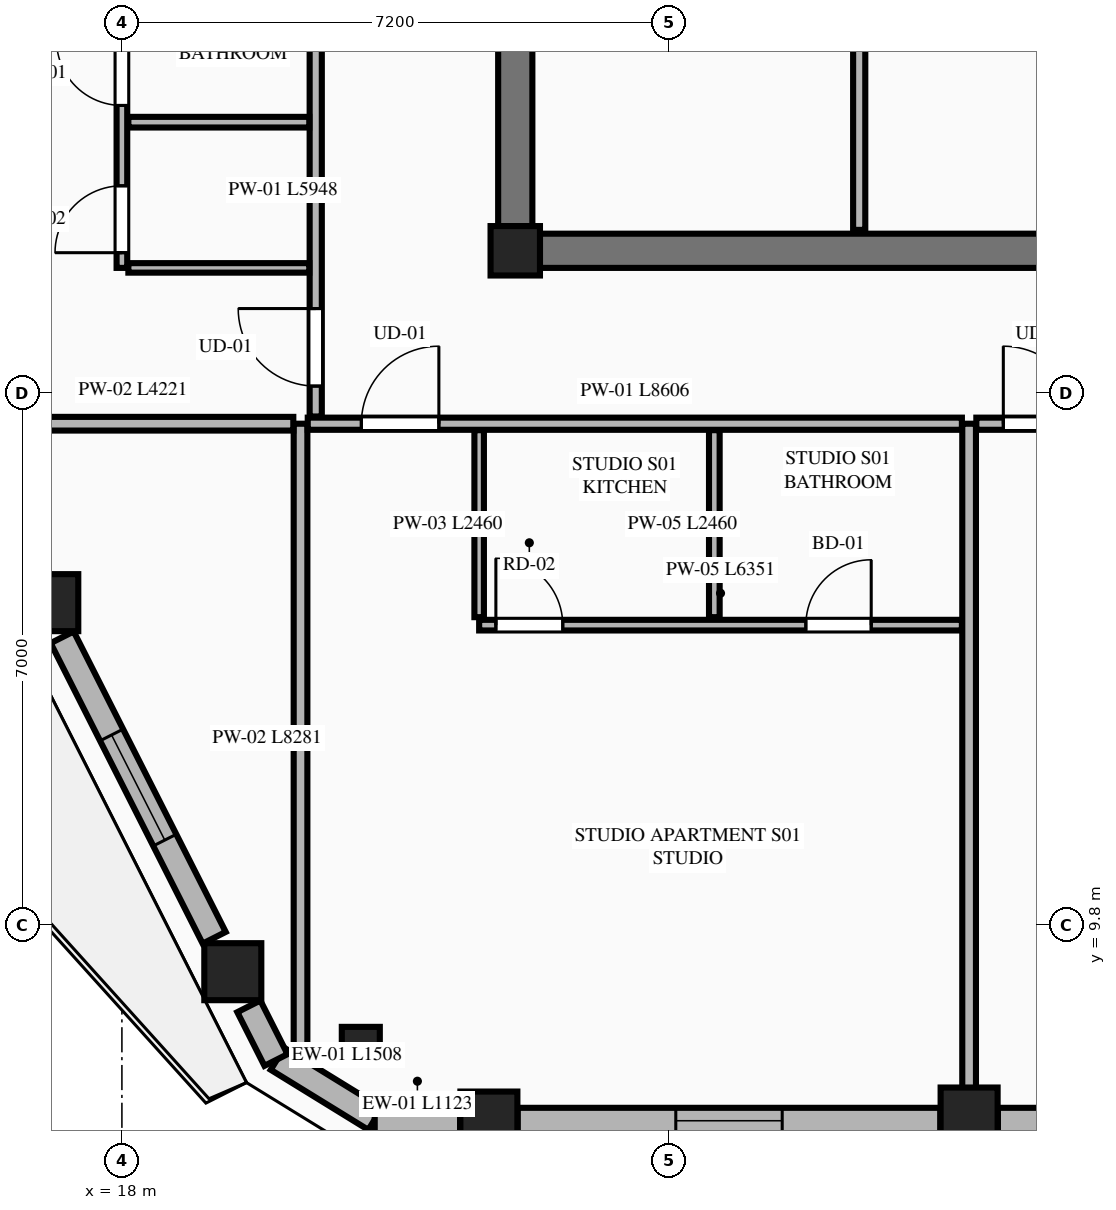
"""IFC4 building model, lengths in metres.
Left out: names, types, materials, properties, quantities, classifications, styles, units other than length and angle.
Written with IfcOpenShell. Run it as: python <this file> out.ifc"""

import sys

from ifc_helpers import new_model, si_unit, direction, frame, frame_2d, origin, origin_2d, place, context, subcontext, project, spatial, rectangle, extrude, element, fill, save


model = new_model("IFC4")
c1 = context("Model", 3, precision=1e-05, world=origin(), true_north=direction((0.0, 1.0)))
c2 = subcontext(c1, "Body", "Model", "MODEL_VIEW")
j1 = project(units=[si_unit("LENGTHUNIT", "METRE"), si_unit("PLANEANGLEUNIT", "RADIAN")], contexts=[c1])
p1 = place(None, origin())
s1 = spatial("IfcSite", under=j1, at=p1, CompositionType="ELEMENT")
p2 = place(p1, origin())
s2 = spatial("IfcBuilding", under=s1, at=p2, CompositionType="ELEMENT")
p3 = place(p2, frame((0.0, 0.0, 245.25)))
s3 = spatial("IfcBuildingStorey", under=s2, at=p3, CompositionType="ELEMENT", Elevation=245.25)
p4 = place(p3, frame((23.175, 18.675, 0.0), z_axis=(0.0, 0.0, 1.0), x_axis=(1.0, 0.0, 0.0)))
e1 = element("IfcColumn", 1, at=p4, inside=s3, PredefinedType="COLUMN", context=c2, shape_type="SweptSolid", body=[
    extrude(rectangle(XDim=0.65, YDim=0.65, at=origin_2d()), origin(), (0.0, 0.0, 1.0), 3.65),
])
p5 = place(p3, frame((23.5, 18.675, 0.0), z_axis=(0.0, 0.0, 1.0), x_axis=(1.0, 0.0, 0.0)))
e2 = element("IfcWall", 2, at=p5, inside=s3, PredefinedType="SHEAR", context=c2, shape_type="SweptSolid", body=[
    extrude(rectangle(XDim=17.8, YDim=0.45, at=frame_2d((8.9, 0.0))), origin(), (0.0, 0.0, 1.0), 3.45),
])
p6 = place(p3, frame((23.175, 19.0, 0.0), z_axis=(0.0, 0.0, 1.0), x_axis=(0.0, 1.0, 0.0)))
e3 = element("IfcWall", 3, at=p6, inside=s3, PredefinedType="SHEAR", context=c2, shape_type="SweptSolid", body=[
    extrude(rectangle(XDim=13.8, YDim=0.45, at=frame_2d((6.9, 0.0))), origin(), (0.0, 0.0, 1.0), 3.45),
])
p7 = place(p6, frame((2.84, 0.0, 0.0)))
e4 = element("IfcOpeningElement", 4, at=p7, cuts=e3, PredefinedType="OPENING", context=c2, shape_type="SweptSolid", body=[
    extrude(rectangle(XDim=1.22, YDim=2.25, at=frame_2d((0.61, 1.125))), frame((0.0, 0.235, 0.0), z_axis=(0.0, -1.0, 0.0), x_axis=(1.0, 0.0, 0.0)), (0.0, 0.0, 1.0), 0.47),
])
for number, where, z_axis, x_axis in (
    (5, (22.828, 7.239, 0.0), (0.0, 0.0, 1.0), (1.0, 0.0, 0.0)),
    (6, (29.146, 7.292, 0.0), (0.0, 0.0, 1.0), (1.0, 0.0, 0.0)),
    (7, (17.051, 14.046, 0.0), (0.0, 0.0, 1.0), (1.0, 0.0, 0.0)),
    (8, (19.459, 9.191, 0.0), (0.0, 0.0, 1.0), (1.0, 0.0, 0.0)),
):
    element("IfcColumn", number, at=place(p3, frame(where, z_axis=z_axis, x_axis=x_axis)), inside=s3, PredefinedType="COLUMN", context=c2, shape_type="SweptSolid", body=[
        extrude(rectangle(XDim=0.75, YDim=0.75, at=origin_2d()), origin(), (0.0, 0.0, 1.0), 3.65),
    ])
p8 = place(p3, frame((21.143, 8.215, 0.0), z_axis=(0.0, 0.0, 1.0), x_axis=(0.865256437757, -0.501329529272, 0.0)))
e9 = element("IfcColumn", 9, at=p8, inside=s3, PredefinedType="PILASTER", context=c2, shape_type="SweptSolid", body=[
    extrude(rectangle(XDim=0.5, YDim=0.35, at=origin_2d()), origin(), (0.0, 0.0, 1.0), 3.65),
])
p9 = place(p3, frame((27.7, 18.95, 0.0), z_axis=(0.0, 0.0, 1.0), x_axis=(0.0, 1.0, 0.0)))
e10 = element("IfcWall", 10, at=p9, inside=s3, PredefinedType="PARTITIONING", context=c2, shape_type="SweptSolid", body=[
    extrude(rectangle(XDim=2.73, YDim=0.16, at=frame_2d((1.365, 0.0))), origin(), (0.0, 0.0, 1.0), 3.45),
])
p10 = place(p3, frame((20.047, 8.045, 0.0), z_axis=(0.0, 0.0, 1.0), x_axis=(0.851680557619, -0.52406128246, 0.0)))
e11 = element("IfcWall", 11, at=p10, inside=s3, PredefinedType="STANDARD", context=c2, shape_type="SweptSolid", body=[
    extrude(rectangle(XDim=1.508, YDim=0.34, at=frame_2d((0.754, 0.0))), origin(), (0.0, 0.0, 1.0), 3.45),
])
p11 = place(p3, frame((21.326, 7.23, 0.0), z_axis=(0.0, 0.0, 1.0), x_axis=(1.0, 0.0, 0.0)))
e12 = element("IfcWall", 12, at=p11, inside=s3, PredefinedType="STANDARD", context=c2, shape_type="SweptSolid", body=[
    extrude(rectangle(XDim=1.123, YDim=0.34, at=frame_2d((0.562, 0.0))), origin(), (0.0, 0.0, 1.0), 3.45),
])
p12 = place(p3, frame((23.207, 7.23, 0.0), z_axis=(0.0, 0.0, 1.0), x_axis=(1.0, 0.0, 0.0)))
e13 = element("IfcWall", 13, at=p12, inside=s3, PredefinedType="STANDARD", context=c2, shape_type="SweptSolid", body=[
    extrude(rectangle(XDim=5.56, YDim=0.34, at=frame_2d((2.78, 0.0))), origin(), (0.0, 0.0, 1.0), 2.983),
])
p13 = place(p12, frame((2.08, 0.0, 0.75)))
e14 = element("IfcOpeningElement", 14, at=p13, cuts=e13, PredefinedType="OPENING", context=c2, shape_type="SweptSolid", body=[
    extrude(rectangle(XDim=1.4, YDim=2.05, at=frame_2d((0.7, 1.025))), frame((0.0, 0.18, 0.0), z_axis=(0.0, -1.0, 0.0), x_axis=(1.0, 0.0, 0.0)), (0.0, 0.0, 1.0), 0.36),
])
p14 = place(p3, frame((29.525, 7.23, 0.0), z_axis=(0.0, 0.0, 1.0), x_axis=(1.0, 0.0, 0.0)))
e15 = element("IfcWall", 15, at=p14, inside=s3, PredefinedType="STANDARD", context=c2, shape_type="SweptSolid", body=[
    extrude(rectangle(XDim=5.75, YDim=0.34, at=frame_2d((2.875, 0.0))), origin(), (0.0, 0.0, 1.0), 2.983),
])
p15 = place(p14, frame((2.325, 0.0, 0.0)))
e16 = element("IfcOpeningElement", 16, at=p15, cuts=e15, PredefinedType="OPENING", context=c2, shape_type="SweptSolid", body=[
    extrude(rectangle(XDim=1.1, YDim=2.25, at=frame_2d((0.55, 1.125))), frame((0.0, 0.18, 0.0), z_axis=(0.0, -1.0, 0.0), x_axis=(1.0, 0.0, 0.0)), (0.0, 0.0, 1.0), 0.36),
])
p16 = place(p3, frame((17.214, 13.59, 0.0), z_axis=(0.0, 0.0, 1.0), x_axis=(0.451440846853, -0.892301048858, 0.0)))
e17 = element("IfcWall", 17, at=p16, inside=s3, PredefinedType="STANDARD", context=c2, shape_type="SweptSolid", body=[
    extrude(rectangle(XDim=4.43, YDim=0.34, at=frame_2d((2.215, 0.0))), origin(), (0.0, 0.0, 1.0), 2.983),
])
p17 = place(p16, frame((1.44, 0.0, 0.75)))
e18 = element("IfcOpeningElement", 18, at=p17, cuts=e17, PredefinedType="OPENING", context=c2, shape_type="SweptSolid", body=[
    extrude(rectangle(XDim=1.55, YDim=2.05, at=frame_2d((0.775, 1.025))), frame((0.0, 0.18, 0.0), z_axis=(0.0, -1.0, 0.0), x_axis=(1.0, 0.0, 0.0)), (0.0, 0.0, 1.0), 0.36),
])
p18 = place(p3, frame((19.67, 8.735, 0.0), z_axis=(0.0, 0.0, 1.0), x_axis=(0.451404919072, -0.89231922485, 0.0)))
e19 = element("IfcWall", 19, at=p18, inside=s3, PredefinedType="STANDARD", context=c2, shape_type="SweptSolid", body=[
    extrude(rectangle(XDim=0.791, YDim=0.34, at=frame_2d((0.396, 0.0))), origin(), (0.0, 0.0, 1.0), 3.45),
])
p19 = place(p3, frame((20.35, 8.119, 0.0), z_axis=(0.0, 0.0, 1.0), x_axis=(0.0, 1.0, 0.0)))
e20 = element("IfcWall", 20, at=p19, inside=s3, PredefinedType="PARTITIONING", context=c2, shape_type="SweptSolid", body=[
    extrude(rectangle(XDim=8.281, YDim=0.18, at=frame_2d((4.141, 0.0))), origin(), (0.0, 0.0, 1.0), 3.45),
])
p20 = place(p3, frame((29.146, 7.405, 0.0), z_axis=(0.0, 0.0, 1.0), x_axis=(0.0, 1.0, 0.0)))
e21 = element("IfcWall", 21, at=p20, inside=s3, PredefinedType="PARTITIONING", context=c2, shape_type="SweptSolid", body=[
    extrude(rectangle(XDim=8.995, YDim=0.18, at=frame_2d((4.498, 0.0))), origin(), (0.0, 0.0, 1.0), 2.907),
])
p21 = place(p3, frame((20.445, 16.4, 0.0), z_axis=(0.0, 0.0, 1.0), x_axis=(1.0, 0.0, 0.0)))
e22 = element("IfcWall", 22, at=p21, inside=s3, PredefinedType="PARTITIONING", context=c2, shape_type="SweptSolid", body=[
    extrude(rectangle(XDim=8.606, YDim=0.16, at=frame_2d((4.303, 0.0))), origin(), (0.0, 0.0, 1.0), 3.45),
])
p22 = place(p21, frame((0.705, 0.0, 0.0)))
e23 = element("IfcOpeningElement", 23, at=p22, cuts=e22, PredefinedType="OPENING", context=c2, shape_type="SweptSolid", body=[
    extrude(rectangle(XDim=1.02, YDim=2.25, at=frame_2d((0.51, 1.125))), frame((0.0, 0.09, 0.0), z_axis=(0.0, -1.0, 0.0), x_axis=(1.0, 0.0, 0.0)), (0.0, 0.0, 1.0), 0.18),
])
p23 = place(p3, frame((22.7, 13.855, 0.0), z_axis=(0.0, 0.0, 1.0), x_axis=(0.0, 1.0, 0.0)))
e24 = element("IfcWall", 24, at=p23, inside=s3, PredefinedType="PARTITIONING", context=c2, shape_type="SweptSolid", body=[
    extrude(rectangle(XDim=2.46, YDim=0.125, at=frame_2d((1.23, 0.0))), origin(), (0.0, 0.0, 1.0), 2.907),
])
p24 = place(p3, frame((22.7, 13.75, 0.0), z_axis=(0.0, 0.0, 1.0), x_axis=(1.0, 0.0, 0.0)))
e25 = element("IfcWall", 25, at=p24, inside=s3, PredefinedType="PLUMBINGWALL", context=c2, shape_type="SweptSolid", body=[
    extrude(rectangle(XDim=6.351, YDim=0.14, at=frame_2d((3.176, 0.0))), origin(), (0.0, 0.0, 1.0), 3.45),
])
p25 = place(p24, frame((4.298, 0.0, 0.0)))
e26 = element("IfcOpeningElement", 26, at=p25, cuts=e25, PredefinedType="OPENING", context=c2, shape_type="SweptSolid", body=[
    extrude(rectangle(XDim=0.86, YDim=2.1, at=frame_2d((0.43, 1.05))), frame((0.0, 0.08, 0.0), z_axis=(0.0, -1.0, 0.0), x_axis=(1.0, 0.0, 0.0)), (0.0, 0.0, 1.0), 0.16),
])
p26 = place(p24, frame((0.22, 0.0, 0.0)))
e27 = element("IfcOpeningElement", 27, at=p26, cuts=e25, PredefinedType="OPENING", context=c2, shape_type="SweptSolid", body=[
    extrude(rectangle(XDim=0.88, YDim=2.15, at=frame_2d((0.44, 1.075))), frame((0.0, 0.08, 0.0), z_axis=(0.0, -1.0, 0.0), x_axis=(1.0, 0.0, 0.0)), (0.0, 0.0, 1.0), 0.16),
])
p27 = place(p3, frame((25.794, 13.855, 0.0), z_axis=(0.0, 0.0, 1.0), x_axis=(0.0, 1.0, 0.0)))
e28 = element("IfcWall", 28, at=p27, inside=s3, PredefinedType="PLUMBINGWALL", context=c2, shape_type="SweptSolid", body=[
    extrude(rectangle(XDim=2.46, YDim=0.14, at=frame_2d((1.23, 0.0))), origin(), (0.0, 0.0, 1.0), 3.45),
])
p28 = place(p3, frame((29.241, 16.4, 0.0), z_axis=(0.0, 0.0, 1.0), x_axis=(1.0, 0.0, 0.0)))
e29 = element("IfcWall", 29, at=p28, inside=s3, PredefinedType="PARTITIONING", context=c2, shape_type="SweptSolid", body=[
    extrude(rectangle(XDim=6.318, YDim=0.16, at=frame_2d((3.159, 0.0))), origin(), (0.0, 0.0, 1.0), 3.45),
])
p29 = place(p28, frame((0.355, 0.0, 0.0)))
e30 = element("IfcOpeningElement", 30, at=p29, cuts=e29, PredefinedType="OPENING", context=c2, shape_type="SweptSolid", body=[
    extrude(rectangle(XDim=1.02, YDim=2.25, at=frame_2d((0.51, 1.125))), frame((0.0, 0.09, 0.0), z_axis=(0.0, -1.0, 0.0), x_axis=(1.0, 0.0, 0.0)), (0.0, 0.0, 1.0), 0.18),
])
p30 = place(p3, frame((16.034, 16.4, 0.0), z_axis=(0.0, 0.0, 1.0), x_axis=(1.0, 0.0, 0.0)))
e31 = element("IfcWall", 31, at=p30, inside=s3, PredefinedType="PARTITIONING", context=c2, shape_type="SweptSolid", body=[
    extrude(rectangle(XDim=4.221, YDim=0.18, at=frame_2d((2.11, 0.0))), origin(), (0.0, 0.0, 1.0), 3.45),
])
p31 = place(p3, frame((20.55, 16.495, 0.0), z_axis=(0.0, 0.0, 1.0), x_axis=(0.0, 1.0, 0.0)))
e32 = element("IfcWall", 32, at=p31, inside=s3, PredefinedType="PARTITIONING", context=c2, shape_type="SweptSolid", body=[
    extrude(rectangle(XDim=5.948, YDim=0.16, at=frame_2d((2.974, 0.0))), origin(), (0.0, 0.0, 1.0), 3.137),
])
p32 = place(p31, frame((0.4, 0.0, 0.0)))
e33 = element("IfcOpeningElement", 33, at=p32, cuts=e32, PredefinedType="OPENING", context=c2, shape_type="SweptSolid", body=[
    extrude(rectangle(XDim=1.02, YDim=2.25, at=frame_2d((0.51, 1.125))), frame((0.0, 0.09, 0.0), z_axis=(0.0, -1.0, 0.0), x_axis=(1.0, 0.0, 0.0)), (0.0, 0.0, 1.0), 0.18),
])
p33 = place(p3, frame((18.085, 18.45, 0.0), z_axis=(0.0, 0.0, 1.0), x_axis=(1.0, 0.0, 0.0)))
e34 = element("IfcWall", 34, at=p33, inside=s3, PredefinedType="PARTITIONING", context=c2, shape_type="SweptSolid", body=[
    extrude(rectangle(XDim=2.38, YDim=0.125, at=frame_2d((1.19, 0.0))), origin(), (0.0, 0.0, 1.0), 3.45),
])
p34 = place(p3, frame((18.0, 18.45, 0.0), z_axis=(0.0, 0.0, 1.0), x_axis=(0.0, 1.0, 0.0)))
e35 = element("IfcWall", 35, at=p34, inside=s3, PredefinedType="PLUMBINGWALL", context=c2, shape_type="SweptSolid", body=[
    extrude(rectangle(XDim=3.993, YDim=0.14, at=frame_2d((1.997, 0.0))), origin(), (0.0, 0.0, 1.0), 3.45),
])
p35 = place(p34, frame((2.137, 0.0, 0.0)))
e36 = element("IfcOpeningElement", 36, at=p35, cuts=e35, PredefinedType="OPENING", context=c2, shape_type="SweptSolid", body=[
    extrude(rectangle(XDim=0.86, YDim=2.1, at=frame_2d((0.43, 1.05))), frame((0.0, 0.08, 0.0), z_axis=(0.0, -1.0, 0.0), x_axis=(1.0, 0.0, 0.0)), (0.0, 0.0, 1.0), 0.16),
])
p36 = place(p34, frame((0.2, 0.0, 0.0)))
e37 = element("IfcOpeningElement", 37, at=p36, cuts=e35, PredefinedType="OPENING", context=c2, shape_type="SweptSolid", body=[
    extrude(rectangle(XDim=0.88, YDim=2.15, at=frame_2d((0.44, 1.075))), frame((0.0, 0.08, 0.0), z_axis=(0.0, -1.0, 0.0), x_axis=(1.0, 0.0, 0.0)), (0.0, 0.0, 1.0), 0.16),
])
p37 = place(p3, frame((18.085, 20.367, 0.0), z_axis=(0.0, 0.0, 1.0), x_axis=(1.0, 0.0, 0.0)))
e38 = element("IfcWall", 38, at=p37, inside=s3, PredefinedType="PLUMBINGWALL", context=c2, shape_type="SweptSolid", body=[
    extrude(rectangle(XDim=2.38, YDim=0.14, at=frame_2d((1.19, 0.0))), origin(), (0.0, 0.0, 1.0), 3.45),
])
p38 = place(p13, origin())
e39 = element("IfcWindow", 39, at=p38, inside=s3, PartitioningType="SINGLE_PANEL", PredefinedType="WINDOW", context=c2, shape_type="SweptSolid", body=[
    extrude(rectangle(XDim=1.4, YDim=2.05, at=frame_2d((0.7, 1.025))), frame((0.0, 0.03, 0.0), z_axis=(0.0, -1.0, 0.0), x_axis=(1.0, 0.0, 0.0)), (0.0, 0.0, 1.0), 0.06),
])
fill(e14, e39)
p39 = place(p17, origin())
e40 = element("IfcWindow", 40, at=p39, inside=s3, PartitioningType="SINGLE_PANEL", PredefinedType="WINDOW", context=c2, shape_type="SweptSolid", body=[
    extrude(rectangle(XDim=1.55, YDim=2.05, at=frame_2d((0.775, 1.025))), frame((0.0, 0.03, 0.0), z_axis=(0.0, -1.0, 0.0), x_axis=(1.0, 0.0, 0.0)), (0.0, 0.0, 1.0), 0.06),
])
fill(e18, e40)
p40 = place(p25, origin())
e41 = element("IfcDoor", 41, at=p40, inside=s3, OperationType="SINGLE_SWING_RIGHT", PredefinedType="DOOR", context=c2, shape_type="SweptSolid", body=[
    extrude(rectangle(XDim=0.86, YDim=2.1, at=frame_2d((0.43, 1.05))), frame((0.0, 0.025, 0.0), z_axis=(0.0, -1.0, 0.0), x_axis=(1.0, 0.0, 0.0)), (0.0, 0.0, 1.0), 0.05),
])
fill(e26, e41)
p41 = place(p22, origin())
e42 = element("IfcDoor", 42, at=p41, inside=s3, OperationType="SINGLE_SWING_RIGHT", PredefinedType="DOOR", context=c2, shape_type="SweptSolid", body=[
    extrude(rectangle(XDim=1.02, YDim=2.25, at=frame_2d((0.51, 1.125))), frame((0.0, 0.025, 0.0), z_axis=(0.0, -1.0, 0.0), x_axis=(1.0, 0.0, 0.0)), (0.0, 0.0, 1.0), 0.05),
])
fill(e23, e42)
p42 = place(p26, origin())
e43 = element("IfcDoor", 43, at=p42, inside=s3, OperationType="SINGLE_SWING_LEFT", PredefinedType="DOOR", context=c2, shape_type="SweptSolid", body=[
    extrude(rectangle(XDim=0.88, YDim=2.15, at=frame_2d((0.44, 1.075))), frame((0.0, 0.025, 0.0), z_axis=(0.0, -1.0, 0.0), x_axis=(1.0, 0.0, 0.0)), (0.0, 0.0, 1.0), 0.05),
])
fill(e27, e43)
p43 = place(p29, origin())
e44 = element("IfcDoor", 44, at=p43, inside=s3, OperationType="SINGLE_SWING_LEFT", PredefinedType="DOOR", context=c2, shape_type="SweptSolid", body=[
    extrude(rectangle(XDim=1.02, YDim=2.25, at=frame_2d((0.51, 1.125))), frame((0.0, 0.025, 0.0), z_axis=(0.0, -1.0, 0.0), x_axis=(1.0, 0.0, 0.0)), (0.0, 0.0, 1.0), 0.05),
])
fill(e30, e44)
p44 = place(p35, origin())
e45 = element("IfcDoor", 45, at=p44, inside=s3, OperationType="SINGLE_SWING_RIGHT", PredefinedType="DOOR", context=c2, shape_type="SweptSolid", body=[
    extrude(rectangle(XDim=0.86, YDim=2.1, at=frame_2d((0.43, 1.05))), frame((0.0, 0.025, 0.0), z_axis=(0.0, -1.0, 0.0), x_axis=(1.0, 0.0, 0.0)), (0.0, 0.0, 1.0), 0.05),
])
fill(e36, e45)
p45 = place(p32, origin())
e46 = element("IfcDoor", 46, at=p45, inside=s3, OperationType="SINGLE_SWING_RIGHT", PredefinedType="DOOR", context=c2, shape_type="SweptSolid", body=[
    extrude(rectangle(XDim=1.02, YDim=2.25, at=frame_2d((0.51, 1.125))), frame((0.0, 0.025, 0.0), z_axis=(0.0, -1.0, 0.0), x_axis=(1.0, 0.0, 0.0)), (0.0, 0.0, 1.0), 0.05),
])
fill(e33, e46)
p46 = place(p36, origin())
e47 = element("IfcDoor", 47, at=p46, inside=s3, OperationType="SINGLE_SWING_LEFT", PredefinedType="DOOR", context=c2, shape_type="SweptSolid", body=[
    extrude(rectangle(XDim=0.88, YDim=2.15, at=frame_2d((0.44, 1.075))), frame((0.0, 0.025, 0.0), z_axis=(0.0, -1.0, 0.0), x_axis=(1.0, 0.0, 0.0)), (0.0, 0.0, 1.0), 0.05),
])
fill(e37, e47)
save(model, sys.argv[1])
